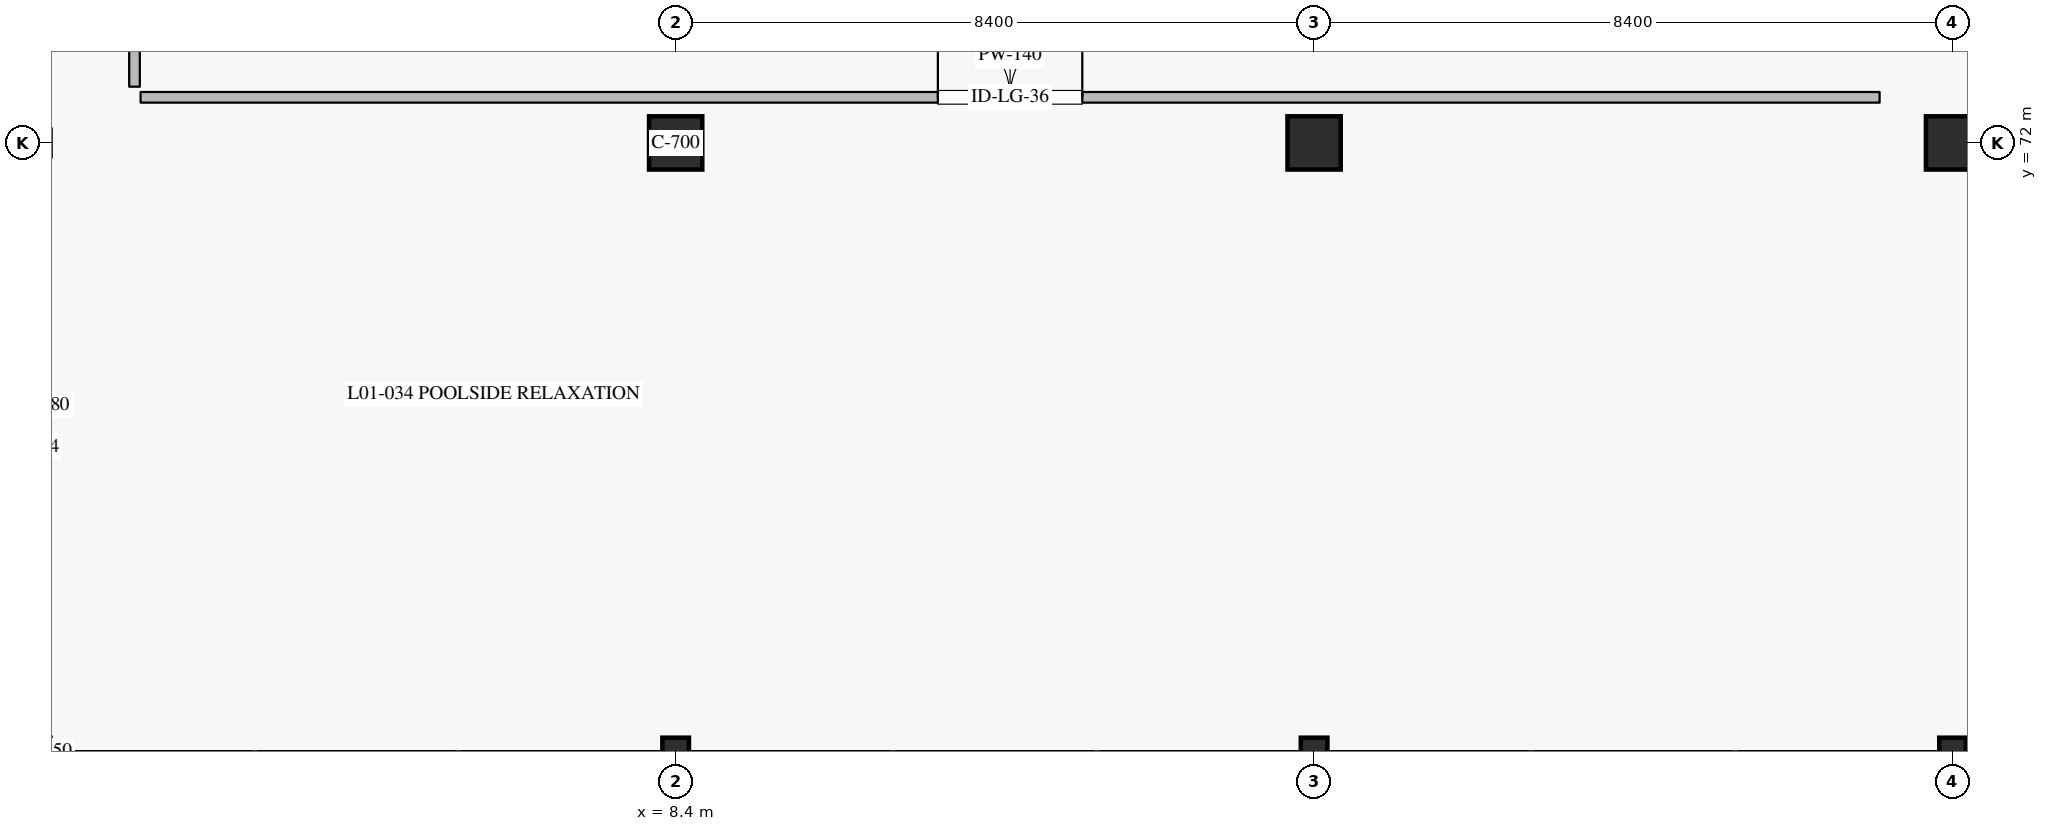
"""IFC4 building model, lengths in metres.
Left out: names, types, materials, properties, quantities, classifications, styles, units other than length and angle.
Written with IfcOpenShell. Run it as: python <this file> out.ifc"""

import sys

from ifc_helpers import new_model, si_unit, direction, frame, frame_2d, origin, origin_2d, place, context, subcontext, project, spatial, rectangle, hollow_rectangle, extrude, element, fill, save


model = new_model("IFC4")
c1 = context("Model", 3, precision=1e-05, world=origin(), true_north=direction((0.0, 1.0)))
c2 = subcontext(c1, "Body", "Model", "MODEL_VIEW")
j1 = project(units=[si_unit("LENGTHUNIT", "METRE"), si_unit("PLANEANGLEUNIT", "RADIAN")], contexts=[c1])
p1 = place(None, origin())
s1 = spatial("IfcSite", under=j1, at=p1, CompositionType="ELEMENT")
p2 = place(p1, origin())
s2 = spatial("IfcBuilding", under=s1, at=p2, CompositionType="ELEMENT")
p3 = place(p2, frame((0.0, 0.0, 6.0)))
s3 = spatial("IfcBuildingStorey", under=s2, at=p3, CompositionType="ELEMENT", Elevation=6.0)
p4 = place(p3, frame((8.4, 64.0, 0.0), z_axis=(0.0, 0.0, 1.0), x_axis=(1.0, 0.0, 0.0)))
e1 = element("IfcColumn", 1, at=p4, inside=s3, PredefinedType="COLUMN", context=c2, shape_type="SweptSolid", body=[
    extrude(hollow_rectangle(XDim=0.35, YDim=0.35, WallThickness=0.016, at=origin_2d()), origin(), (0.0, 0.0, 1.0), 5.4),
])
p5 = place(p3, frame((8.4, 72.0, 0.0), z_axis=(0.0, 0.0, 1.0), x_axis=(1.0, 0.0, 0.0)))
e2 = element("IfcColumn", 2, at=p5, inside=s3, PredefinedType="COLUMN", context=c2, shape_type="SweptSolid", body=[
    extrude(rectangle(XDim=0.7, YDim=0.7, at=origin_2d()), origin(), (0.0, 0.0, 1.0), 5.4),
])
p6 = place(p3, frame((16.8, 64.0, 0.0), z_axis=(0.0, 0.0, 1.0), x_axis=(1.0, 0.0, 0.0)))
e3 = element("IfcColumn", 3, at=p6, inside=s3, PredefinedType="COLUMN", context=c2, shape_type="SweptSolid", body=[
    extrude(hollow_rectangle(XDim=0.35, YDim=0.35, WallThickness=0.016, at=origin_2d()), origin(), (0.0, 0.0, 1.0), 5.4),
])
p7 = place(p3, frame((16.8, 72.0, 0.0), z_axis=(0.0, 0.0, 1.0), x_axis=(1.0, 0.0, 0.0)))
e4 = element("IfcColumn", 4, at=p7, inside=s3, PredefinedType="COLUMN", context=c2, shape_type="SweptSolid", body=[
    extrude(rectangle(XDim=0.7, YDim=0.7, at=origin_2d()), origin(), (0.0, 0.0, 1.0), 5.4),
])
p8 = place(p3, frame((25.2, 64.0, 0.0), z_axis=(0.0, 0.0, 1.0), x_axis=(1.0, 0.0, 0.0)))
e5 = element("IfcColumn", 5, at=p8, inside=s3, PredefinedType="COLUMN", context=c2, shape_type="SweptSolid", body=[
    extrude(hollow_rectangle(XDim=0.35, YDim=0.35, WallThickness=0.016, at=origin_2d()), origin(), (0.0, 0.0, 1.0), 5.4),
])
p9 = place(p3, frame((25.2, 72.0, 0.0), z_axis=(0.0, 0.0, 1.0), x_axis=(1.0, 0.0, 0.0)))
e6 = element("IfcColumn", 6, at=p9, inside=s3, PredefinedType="COLUMN", context=c2, shape_type="SweptSolid", body=[
    extrude(rectangle(XDim=0.7, YDim=0.7, at=origin_2d()), origin(), (0.0, 0.0, 1.0), 5.4),
])
p10 = place(p3, frame((1.36, 72.6, 0.0), z_axis=(0.0, 0.0, 1.0), x_axis=(1.0, 0.0, 0.0)))
e7 = element("IfcWall", 7, at=p10, inside=s3, PredefinedType="PARTITIONING", context=c2, shape_type="SweptSolid", body=[
    extrude(rectangle(XDim=22.88, YDim=0.14, at=frame_2d((11.44, 0.0))), origin(), (0.0, 0.0, 1.0), 5.045),
])
p11 = place(p10, frame((10.49, 0.0, 0.0)))
e8 = element("IfcOpeningElement", 8, at=p11, cuts=e7, PredefinedType="OPENING", context=c2, shape_type="SweptSolid", body=[
    extrude(rectangle(XDim=1.9, YDim=2.4, at=frame_2d((0.95, 1.2))), frame((0.0, 0.08, 0.0), z_axis=(0.0, -1.0, 0.0), x_axis=(1.0, 0.0, 0.0)), (0.0, 0.0, 1.0), 0.16),
])
p12 = place(p3, frame((1.28, 72.74, 0.0), z_axis=(0.0, 0.0, 1.0), x_axis=(0.0, 1.0, 0.0)))
e9 = element("IfcWall", 9, at=p12, inside=s3, PredefinedType="PARTITIONING", context=c2, shape_type="SweptSolid", body=[
    extrude(rectangle(XDim=30.41, YDim=0.14, at=frame_2d((15.205, 0.0))), origin(), (0.0, 0.0, 1.0), 5.045),
])
p13 = place(p11, origin())
e10 = element("IfcDoor", 10, at=p13, inside=s3, OperationType="DOUBLE_DOOR_SINGLE_SWING", PredefinedType="DOOR", context=c2, shape_type="SweptSolid", body=[
    extrude(rectangle(XDim=1.9, YDim=2.4, at=frame_2d((0.95, 1.2))), frame((0.0, 0.025, 0.0), z_axis=(0.0, -1.0, 0.0), x_axis=(1.0, 0.0, 0.0)), (0.0, 0.0, 1.0), 0.05),
])
fill(e8, e10)
save(model, sys.argv[1])
